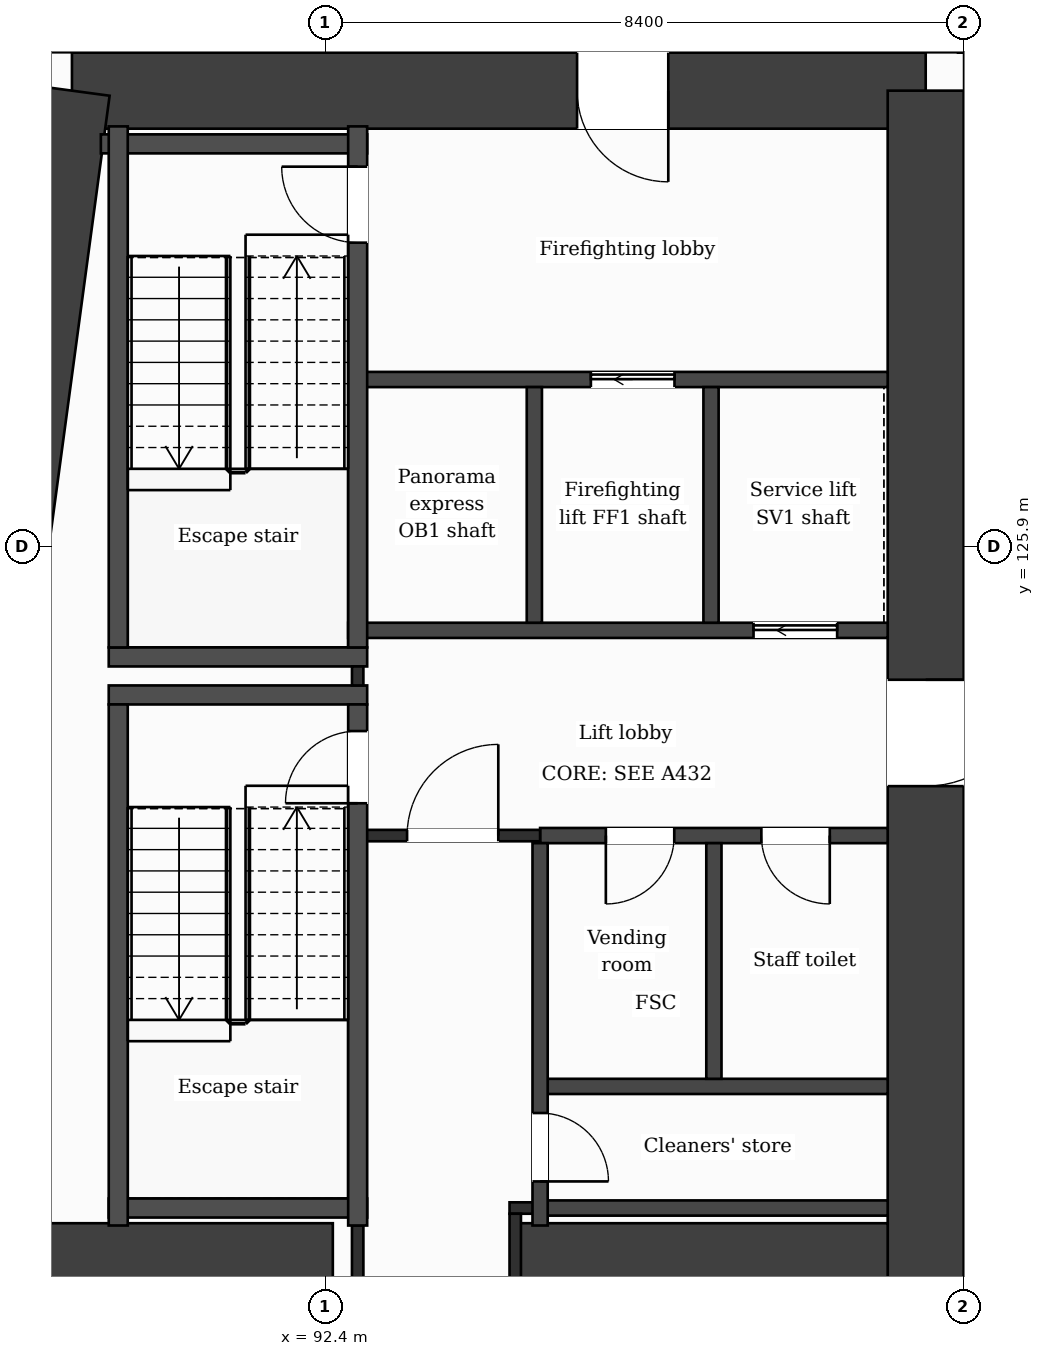
"""IFC4 building model, lengths in metres.
Left out: names, types, materials, properties, quantities, classifications, styles, units other than length and angle.
Written with IfcOpenShell. Run it as: python <this file> out.ifc"""

import sys

from ifc_helpers import new_model, si_unit, direction, frame, frame_2d, origin, place, context, subcontext, project, spatial, rectangle, extrude, element, fill, save


model = new_model("IFC4")
c1 = context("Model", 3, precision=1e-05, world=origin(), true_north=direction((0.0, 1.0)))
c2 = subcontext(c1, "Body", "Model", "MODEL_VIEW")
j1 = project(units=[si_unit("LENGTHUNIT", "METRE"), si_unit("PLANEANGLEUNIT", "RADIAN")], contexts=[c1])
p1 = place(None, origin())
s1 = spatial("IfcSite", under=j1, at=p1, CompositionType="ELEMENT")
p2 = place(p1, origin())
s2 = spatial("IfcBuilding", under=s1, at=p2, CompositionType="ELEMENT")
p3 = place(p2, frame((0.0, 0.0, 131.7)))
s3 = spatial("IfcBuildingStorey", under=s2, at=p3, CompositionType="ELEMENT", Elevation=131.7)
p4 = place(p3, frame((89.068, 131.9, 0.0), z_axis=(0.0, 0.0, 1.0), x_axis=(1.0, 0.0, 0.0)))
e1 = element("IfcWall", 1, at=p4, inside=s3, PredefinedType="SHEAR", context=c2, shape_type="SweptSolid", body=[
    extrude(rectangle(XDim=11.232, YDim=1.0, at=frame_2d((5.616, 0.0))), origin(), (0.0, 0.0, 1.0), 3.7),
])
p5 = place(p4, frame((6.646, 0.0, 0.0)))
e2 = element("IfcOpeningElement", 2, at=p5, cuts=e1, PredefinedType="OPENING", context=c2, shape_type="SweptSolid", body=[
    extrude(rectangle(XDim=1.2, YDim=2.1, at=frame_2d((0.6, 1.05))), frame((0.0, 0.51, 0.0), z_axis=(0.0, -1.0, 0.0), x_axis=(1.0, 0.0, 0.0)), (0.0, 0.0, 1.0), 1.02),
])
p6 = place(p3, frame((100.3, 131.9, 0.0), z_axis=(0.0, 0.0, 1.0), x_axis=(0.0, -1.0, 0.0)))
e3 = element("IfcWall", 3, at=p6, inside=s3, PredefinedType="SHEAR", context=c2, shape_type="SweptSolid", body=[
    extrude(rectangle(XDim=21.0, YDim=1.0, at=frame_2d((10.5, 0.0))), origin(), (0.0, 0.0, 1.0), 3.7),
])
p7 = place(p6, frame((7.75, 0.0, 0.0)))
e4 = element("IfcOpeningElement", 4, at=p7, cuts=e3, PredefinedType="OPENING", context=c2, shape_type="SweptSolid", body=[
    extrude(rectangle(XDim=1.4, YDim=2.1, at=frame_2d((0.7, 1.05))), frame((0.0, 0.51, 0.0), z_axis=(0.0, -1.0, 0.0), x_axis=(1.0, 0.0, 0.0)), (0.0, 0.0, 1.0), 1.02),
])
p8 = place(p3, frame((86.241, 110.9, 0.0), z_axis=(0.0, 0.0, 1.0), x_axis=(0.133411141623, 0.991060778808, 0.0)))
e5 = element("IfcWall", 5, at=p8, inside=s3, PredefinedType="SHEAR", context=c2, shape_type="SweptSolid", body=[
    extrude(rectangle(XDim=21.189, YDim=1.0, at=frame_2d((10.595, 0.0))), origin(), (0.0, 0.0, 1.0), 3.7),
])
p9 = place(p3, frame((87.423, 116.5, 0.0), z_axis=(0.0, 0.0, 1.0), x_axis=(1.0, 0.0, 0.0)))
e6 = element("IfcWall", 6, at=p9, inside=s3, PredefinedType="SHEAR", context=c2, shape_type="SweptSolid", body=[
    extrude(rectangle(XDim=5.077, YDim=1.0, at=frame_2d((2.539, 0.0))), origin(), (0.0, 0.0, 1.0), 3.7),
])
p10 = place(p3, frame((94.9, 116.5, 0.0), z_axis=(0.0, 0.0, 1.0), x_axis=(1.0, 0.0, 0.0)))
e7 = element("IfcWall", 7, at=p10, inside=s3, PredefinedType="SHEAR", context=c2, shape_type="SweptSolid", body=[
    extrude(rectangle(XDim=4.9, YDim=1.0, at=frame_2d((2.45, 0.0))), origin(), (0.0, 0.0, 1.0), 3.7),
])
p11 = place(p3, frame((91.177, 138.95, 0.0), z_axis=(0.0, 0.0, 1.0), x_axis=(-0.133426664613, -0.991058689065, 0.0)))
e8 = element("IfcWall", 8, at=p11, inside=s3, PredefinedType="SOLIDWALL", context=c2, shape_type="SweptSolid", body=[
    extrude(rectangle(XDim=6.609, YDim=0.3, at=frame_2d((3.305, 0.0))), origin(), (0.0, 0.0, 1.0), 3.2),
])
p12 = place(p11, frame((1.039, 0.0, 0.9)))
e9 = element("IfcOpeningElement", 9, at=p12, cuts=e8, PredefinedType="OPENING", context=c2, shape_type="SweptSolid", body=[
    extrude(rectangle(XDim=1.2, YDim=2.1, at=frame_2d((0.6, 1.05))), frame((0.0, 0.16, 0.0), z_axis=(0.0, -1.0, 0.0), x_axis=(1.0, 0.0, 0.0)), (0.0, 0.0, 1.0), 0.32),
])
p13 = place(p11, frame((4.294, 0.0, 0.0)))
e10 = element("IfcOpeningElement", 10, at=p13, cuts=e8, PredefinedType="OPENING", context=c2, shape_type="SweptSolid", body=[
    extrude(rectangle(XDim=1.2, YDim=2.4, at=frame_2d((0.6, 1.2))), frame((0.0, 0.16, 0.0), z_axis=(0.0, -1.0, 0.0), x_axis=(1.0, 0.0, 0.0)), (0.0, 0.0, 1.0), 0.32),
])
p14 = place(p3, frame((95.227, 117.2, 0.0), z_axis=(0.0, 0.0, 1.0), x_axis=(1.0, 0.0, 0.0)))
e11 = element("IfcWall", 11, at=p14, inside=s3, PredefinedType="PARTITIONING", context=c2, shape_type="SweptSolid", body=[
    extrude(rectangle(XDim=4.573, YDim=0.2, at=frame_2d((2.287, 0.0))), origin(), (0.0, 0.0, 1.0), 3.2),
])
p15 = place(p3, frame((94.825, 117.2, 0.0), z_axis=(0.0, 0.0, 1.0), x_axis=(1.0, 0.0, 0.0)))
e12 = element("IfcWall", 12, at=p15, inside=s3, PredefinedType="PARTITIONING", context=c2, shape_type="SweptSolid", body=[
    extrude(rectangle(XDim=0.402, YDim=0.15, at=frame_2d((0.201, 0.0))), origin(), (0.0, 0.0, 1.0), 3.2),
])
p16 = place(p3, frame((89.552, 117.2, 0.0), z_axis=(0.0, 0.0, 1.0), x_axis=(1.0, 0.0, 0.0)))
e13 = element("IfcWall", 13, at=p16, inside=s3, PredefinedType="PARTITIONING", context=c2, shape_type="SweptSolid", body=[
    extrude(rectangle(XDim=3.4, YDim=0.25, at=frame_2d((1.7, 0.0))), origin(), (0.0, 0.0, 1.0), 3.2),
])
p17 = place(p3, frame((95.227, 118.8, 0.0), z_axis=(0.0, 0.0, 1.0), x_axis=(1.0, 0.0, 0.0)))
e14 = element("IfcWall", 14, at=p17, inside=s3, PredefinedType="PARTITIONING", context=c2, shape_type="SweptSolid", body=[
    extrude(rectangle(XDim=4.573, YDim=0.2, at=frame_2d((2.287, 0.0))), origin(), (0.0, 0.0, 1.0), 3.2),
])
p18 = place(p3, frame((95.227, 122.1, 0.0), z_axis=(0.0, 0.0, 1.0), x_axis=(1.0, 0.0, 0.0)))
e15 = element("IfcWall", 15, at=p18, inside=s3, PredefinedType="PARTITIONING", context=c2, shape_type="SweptSolid", body=[
    extrude(rectangle(XDim=4.573, YDim=0.2, at=frame_2d((2.287, 0.0))), origin(), (0.0, 0.0, 1.0), 3.2),
])
p19 = place(p18, frame((0.865, 0.0, 0.0)))
e16 = element("IfcOpeningElement", 16, at=p19, cuts=e15, PredefinedType="OPENING", context=c2, shape_type="SweptSolid", body=[
    extrude(rectangle(XDim=0.9, YDim=2.1, at=frame_2d((0.45, 1.05))), frame((0.0, 0.11, 0.0), z_axis=(0.0, -1.0, 0.0), x_axis=(1.0, 0.0, 0.0)), (0.0, 0.0, 1.0), 0.22),
])
p20 = place(p18, frame((2.911, 0.0, 0.0)))
e17 = element("IfcOpeningElement", 17, at=p20, cuts=e15, PredefinedType="OPENING", context=c2, shape_type="SweptSolid", body=[
    extrude(rectangle(XDim=0.9, YDim=2.1, at=frame_2d((0.45, 1.05))), frame((0.0, 0.11, 0.0), z_axis=(0.0, -1.0, 0.0), x_axis=(1.0, 0.0, 0.0)), (0.0, 0.0, 1.0), 0.22),
])
p21 = place(p3, frame((92.827, 122.1, 0.0), z_axis=(0.0, 0.0, 1.0), x_axis=(1.0, 0.0, 0.0)))
e18 = element("IfcWall", 18, at=p21, inside=s3, PredefinedType="PARTITIONING", context=c2, shape_type="SweptSolid", body=[
    extrude(rectangle(XDim=2.4, YDim=0.15, at=frame_2d((1.2, 0.0))), origin(), (0.0, 0.0, 1.0), 3.2),
])
p22 = place(p21, frame((0.65, 0.0, 0.0)))
e19 = element("IfcOpeningElement", 19, at=p22, cuts=e18, PredefinedType="OPENING", context=c2, shape_type="SweptSolid", body=[
    extrude(rectangle(XDim=1.2, YDim=2.1, at=frame_2d((0.6, 1.05))), frame((0.0, 0.085, 0.0), z_axis=(0.0, -1.0, 0.0), x_axis=(1.0, 0.0, 0.0)), (0.0, 0.0, 1.0), 0.17),
])
for number, where, z_axis, x_axis in (
    (20, (89.552, 123.95, 0.0), (0.0, 0.0, 1.0), (1.0, 0.0, 0.0)),
    (21, (89.552, 124.45, 0.0), (0.0, 0.0, 1.0), (1.0, 0.0, 0.0)),
):
    element("IfcWall", number, at=place(p3, frame(where, z_axis=z_axis, x_axis=x_axis)), inside=s3, PredefinedType="PARTITIONING", context=c2, shape_type="SweptSolid", body=[
        extrude(rectangle(XDim=3.4, YDim=0.25, at=frame_2d((1.7, 0.0))), origin(), (0.0, 0.0, 1.0), 3.2),
    ])
p23 = place(p3, frame((92.702, 124.8, 0.0), z_axis=(0.0, 0.0, 1.0), x_axis=(1.0, 0.0, 0.0)))
e22 = element("IfcWall", 22, at=p23, inside=s3, PredefinedType="PARTITIONING", context=c2, shape_type="SweptSolid", body=[
    extrude(rectangle(XDim=7.098, YDim=0.2, at=frame_2d((3.549, 0.0))), origin(), (0.0, 0.0, 1.0), 3.2),
])
p24 = place(p23, frame((5.333, 0.0, 0.0)))
e23 = element("IfcOpeningElement", 23, at=p24, cuts=e22, PredefinedType="OPENING", context=c2, shape_type="SweptSolid", body=[
    extrude(rectangle(XDim=1.1, YDim=2.1, at=frame_2d((0.55, 1.05))), frame((0.0, 0.11, 0.0), z_axis=(0.0, -1.0, 0.0), x_axis=(1.0, 0.0, 0.0)), (0.0, 0.0, 1.0), 0.22),
])
p25 = place(p3, frame((92.827, 128.1, 0.0), z_axis=(0.0, 0.0, 1.0), x_axis=(1.0, 0.0, 0.0)))
e24 = element("IfcWall", 24, at=p25, inside=s3, PredefinedType="PARTITIONING", context=c2, shape_type="SweptSolid", body=[
    extrude(rectangle(XDim=6.973, YDim=0.2, at=frame_2d((3.487, 0.0))), origin(), (0.0, 0.0, 1.0), 3.2),
])
p26 = place(p25, frame((3.068, 0.0, 0.0)))
e25 = element("IfcOpeningElement", 25, at=p26, cuts=e24, PredefinedType="OPENING", context=c2, shape_type="SweptSolid", body=[
    extrude(rectangle(XDim=1.1, YDim=2.1, at=frame_2d((0.55, 1.05))), frame((0.0, 0.11, 0.0), z_axis=(0.0, -1.0, 0.0), x_axis=(1.0, 0.0, 0.0)), (0.0, 0.0, 1.0), 0.22),
])
p27 = place(p3, frame((89.448, 131.2, 0.0), z_axis=(0.0, 0.0, 1.0), x_axis=(1.0, 0.0, 0.0)))
e26 = element("IfcWall", 26, at=p27, inside=s3, PredefinedType="PARTITIONING", context=c2, shape_type="SweptSolid", body=[
    extrude(rectangle(XDim=3.504, YDim=0.25, at=frame_2d((1.752, 0.0))), origin(), (0.0, 0.0, 1.0), 3.2),
])
for number, where, z_axis, x_axis in (
    (27, (89.677, 116.97, 0.0), (0.0, 0.0, 1.0), (0.0, 1.0, 0.0)),
    (28, (89.677, 124.575, 0.0), (0.0, 0.0, 1.0), (0.0, 1.0, 0.0)),
):
    element("IfcWall", number, at=place(p3, frame(where, z_axis=z_axis, x_axis=x_axis)), inside=s3, PredefinedType="PARTITIONING", context=c2, shape_type="SweptSolid", body=[
        extrude(rectangle(XDim=6.855, YDim=0.25, at=frame_2d((3.427, 0.0))), origin(), (0.0, 0.0, 1.0), 3.2),
    ])
p28 = place(p3, frame((92.827, 116.0, 0.0), z_axis=(0.0, 0.0, 1.0), x_axis=(0.0, 1.0, 0.0)))
e29 = element("IfcWall", 29, at=p28, inside=s3, PredefinedType="PARTITIONING", context=c2, shape_type="SweptSolid", body=[
    extrude(rectangle(XDim=0.97, YDim=0.15, at=frame_2d((0.485, 0.0))), origin(), (0.0, 0.0, 1.0), 3.2),
])
p29 = place(p3, frame((92.827, 124.075, 0.0), z_axis=(0.0, 0.0, 1.0), x_axis=(0.0, 1.0, 0.0)))
e30 = element("IfcWall", 30, at=p29, inside=s3, PredefinedType="PARTITIONING", context=c2, shape_type="SweptSolid", body=[
    extrude(rectangle(XDim=0.25, YDim=0.15, at=frame_2d((0.125, 0.0))), origin(), (0.0, 0.0, 1.0), 3.2),
])
p30 = place(p3, frame((92.827, 116.97, 0.0), z_axis=(0.0, 0.0, 1.0), x_axis=(0.0, 1.0, 0.0)))
e31 = element("IfcWall", 31, at=p30, inside=s3, PredefinedType="PARTITIONING", context=c2, shape_type="SweptSolid", body=[
    extrude(rectangle(XDim=6.855, YDim=0.25, at=frame_2d((3.427, 0.0))), origin(), (0.0, 0.0, 1.0), 3.2),
])
p31 = place(p30, frame((5.555, 0.0, 0.0)))
e32 = element("IfcOpeningElement", 32, at=p31, cuts=e31, PredefinedType="OPENING", context=c2, shape_type="SweptSolid", body=[
    extrude(rectangle(XDim=0.95, YDim=2.1, at=frame_2d((0.475, 1.05))), frame((0.0, 0.135, 0.0), z_axis=(0.0, -1.0, 0.0), x_axis=(1.0, 0.0, 0.0)), (0.0, 0.0, 1.0), 0.27),
])
p32 = place(p3, frame((92.827, 124.575, 0.0), z_axis=(0.0, 0.0, 1.0), x_axis=(0.0, 1.0, 0.0)))
e33 = element("IfcWall", 33, at=p32, inside=s3, PredefinedType="PARTITIONING", context=c2, shape_type="SweptSolid", body=[
    extrude(rectangle(XDim=6.855, YDim=0.25, at=frame_2d((3.427, 0.0))), origin(), (0.0, 0.0, 1.0), 3.2),
])
p33 = place(p32, frame((5.325, 0.0, 0.0)))
e34 = element("IfcOpeningElement", 34, at=p33, cuts=e33, PredefinedType="OPENING", context=c2, shape_type="SweptSolid", body=[
    extrude(rectangle(XDim=1.0, YDim=2.1, at=frame_2d((0.5, 1.05))), frame((0.0, 0.135, 0.0), z_axis=(0.0, -1.0, 0.0), x_axis=(1.0, 0.0, 0.0)), (0.0, 0.0, 1.0), 0.27),
])
p34 = place(p3, frame((94.9, 116.0, 0.0), z_axis=(0.0, 0.0, 1.0), x_axis=(0.0, 1.0, 0.0)))
e35 = element("IfcWall", 35, at=p34, inside=s3, PredefinedType="PARTITIONING", context=c2, shape_type="SweptSolid", body=[
    extrude(rectangle(XDim=1.125, YDim=0.15, at=frame_2d((0.562, 0.0))), origin(), (0.0, 0.0, 1.0), 3.2),
])
p35 = place(p3, frame((95.151, 124.9, 0.0), z_axis=(0.0, 0.0, 1.0), x_axis=(0.0, 1.0, 0.0)))
e36 = element("IfcWall", 36, at=p35, inside=s3, PredefinedType="PARTITIONING", context=c2, shape_type="SweptSolid", body=[
    extrude(rectangle(XDim=3.1, YDim=0.2, at=frame_2d((1.55, 0.0))), origin(), (0.0, 0.0, 1.0), 3.2),
])
p36 = place(p3, frame((95.227, 116.97, 0.0), z_axis=(0.0, 0.0, 1.0), x_axis=(0.0, 1.0, 0.0)))
e37 = element("IfcWall", 37, at=p36, inside=s3, PredefinedType="PARTITIONING", context=c2, shape_type="SweptSolid", body=[
    extrude(rectangle(XDim=5.03, YDim=0.2, at=frame_2d((2.515, 0.0))), origin(), (0.0, 0.0, 1.0), 3.2),
])
p37 = place(p36, frame((0.58, 0.0, 0.0)))
e38 = element("IfcOpeningElement", 38, at=p37, cuts=e37, PredefinedType="OPENING", context=c2, shape_type="SweptSolid", body=[
    extrude(rectangle(XDim=0.9, YDim=2.1, at=frame_2d((0.45, 1.05))), frame((0.0, 0.11, 0.0), z_axis=(0.0, -1.0, 0.0), x_axis=(1.0, 0.0, 0.0)), (0.0, 0.0, 1.0), 0.22),
])
for number, where, z_axis, x_axis in (
    (39, (97.476, 124.9, 0.0), (0.0, 0.0, 1.0), (0.0, 1.0, 0.0)),
    (40, (97.513, 118.9, 0.0), (0.0, 0.0, 1.0), (0.0, 1.0, 0.0)),
):
    element("IfcWall", number, at=place(p3, frame(where, z_axis=z_axis, x_axis=x_axis)), inside=s3, PredefinedType="PARTITIONING", context=c2, shape_type="SweptSolid", body=[
        extrude(rectangle(XDim=3.1, YDim=0.2, at=frame_2d((1.55, 0.0))), origin(), (0.0, 0.0, 1.0), 3.2),
    ])
p38 = place(p22, origin())
e41 = element("IfcDoor", 41, at=p38, inside=s3, OperationType="SINGLE_SWING_RIGHT", PredefinedType="DOOR", context=c2, shape_type="SweptSolid", body=[
    extrude(rectangle(XDim=1.2, YDim=2.1, at=frame_2d((0.6, 1.05))), frame((0.0, 0.025, 0.0), z_axis=(0.0, -1.0, 0.0), x_axis=(1.0, 0.0, 0.0)), (0.0, 0.0, 1.0), 0.05),
])
fill(e19, e41)
p39 = place(p26, origin())
e42 = element("IfcDoor", 42, at=p39, inside=s3, OperationType="SLIDING_TO_LEFT", PredefinedType="DOOR", context=c2, shape_type="SweptSolid", body=[
    extrude(rectangle(XDim=1.1, YDim=2.1, at=frame_2d((0.55, 1.05))), frame((0.0, 0.025, 0.0), z_axis=(0.0, -1.0, 0.0), x_axis=(1.0, 0.0, 0.0)), (0.0, 0.0, 1.0), 0.05),
])
fill(e25, e42)
p40 = place(p24, origin())
e43 = element("IfcDoor", 43, at=p40, inside=s3, OperationType="SLIDING_TO_LEFT", PredefinedType="DOOR", context=c2, shape_type="SweptSolid", body=[
    extrude(rectangle(XDim=1.1, YDim=2.1, at=frame_2d((0.55, 1.05))), frame((0.0, 0.025, 0.0), z_axis=(0.0, -1.0, 0.0), x_axis=(1.0, 0.0, 0.0)), (0.0, 0.0, 1.0), 0.05),
])
fill(e23, e43)
p41 = place(p19, origin())
e44 = element("IfcDoor", 44, at=p41, inside=s3, OperationType="SINGLE_SWING_LEFT", PredefinedType="DOOR", context=c2, shape_type="SweptSolid", body=[
    extrude(rectangle(XDim=0.9, YDim=2.1, at=frame_2d((0.45, 1.05))), frame((0.0, 0.025, 0.0), z_axis=(0.0, -1.0, 0.0), x_axis=(1.0, 0.0, 0.0)), (0.0, 0.0, 1.0), 0.05),
])
fill(e16, e44)
p42 = place(p20, origin())
e45 = element("IfcDoor", 45, at=p42, inside=s3, OperationType="SINGLE_SWING_RIGHT", PredefinedType="DOOR", context=c2, shape_type="SweptSolid", body=[
    extrude(rectangle(XDim=0.9, YDim=2.1, at=frame_2d((0.45, 1.05))), frame((0.0, 0.025, 0.0), z_axis=(0.0, -1.0, 0.0), x_axis=(1.0, 0.0, 0.0)), (0.0, 0.0, 1.0), 0.05),
])
fill(e17, e45)
p43 = place(p31, origin())
e46 = element("IfcDoor", 46, at=p43, inside=s3, OperationType="SINGLE_SWING_LEFT", PredefinedType="DOOR", context=c2, shape_type="SweptSolid", body=[
    extrude(rectangle(XDim=0.95, YDim=2.1, at=frame_2d((0.475, 1.05))), frame((0.0, 0.025, 0.0), z_axis=(0.0, -1.0, 0.0), x_axis=(1.0, 0.0, 0.0)), (0.0, 0.0, 1.0), 0.05),
])
fill(e32, e46)
p44 = place(p33, origin())
e47 = element("IfcDoor", 47, at=p44, inside=s3, OperationType="SINGLE_SWING_RIGHT", PredefinedType="DOOR", context=c2, shape_type="SweptSolid", body=[
    extrude(rectangle(XDim=1.0, YDim=2.1, at=frame_2d((0.5, 1.05))), frame((0.0, 0.025, 0.0), z_axis=(0.0, -1.0, 0.0), x_axis=(1.0, 0.0, 0.0)), (0.0, 0.0, 1.0), 0.05),
])
fill(e34, e47)
p45 = place(p37, origin())
e48 = element("IfcDoor", 48, at=p45, inside=s3, OperationType="SINGLE_SWING_LEFT", PredefinedType="DOOR", context=c2, shape_type="SweptSolid", body=[
    extrude(rectangle(XDim=0.9, YDim=2.1, at=frame_2d((0.45, 1.05))), frame((0.0, 0.025, 0.0), z_axis=(0.0, -1.0, 0.0), x_axis=(1.0, 0.0, 0.0)), (0.0, 0.0, 1.0), 0.05),
])
fill(e38, e48)
p46 = place(p5, origin())
e49 = element("IfcDoor", 49, at=p46, inside=s3, OperationType="SINGLE_SWING_RIGHT", PredefinedType="DOOR", context=c2, shape_type="SweptSolid", body=[
    extrude(rectangle(XDim=1.2, YDim=2.1, at=frame_2d((0.6, 1.05))), frame((0.0, 0.025, 0.0), z_axis=(0.0, -1.0, 0.0), x_axis=(1.0, 0.0, 0.0)), (0.0, 0.0, 1.0), 0.05),
])
fill(e2, e49)
p47 = place(p7, origin())
e50 = element("IfcDoor", 50, at=p47, inside=s3, OperationType="SINGLE_SWING_LEFT", PredefinedType="DOOR", context=c2, shape_type="SweptSolid", body=[
    extrude(rectangle(XDim=1.4, YDim=2.1, at=frame_2d((0.7, 1.05))), frame((0.0, 0.025, 0.0), z_axis=(0.0, -1.0, 0.0), x_axis=(1.0, 0.0, 0.0)), (0.0, 0.0, 1.0), 0.05),
])
fill(e4, e50)
save(model, sys.argv[1])
